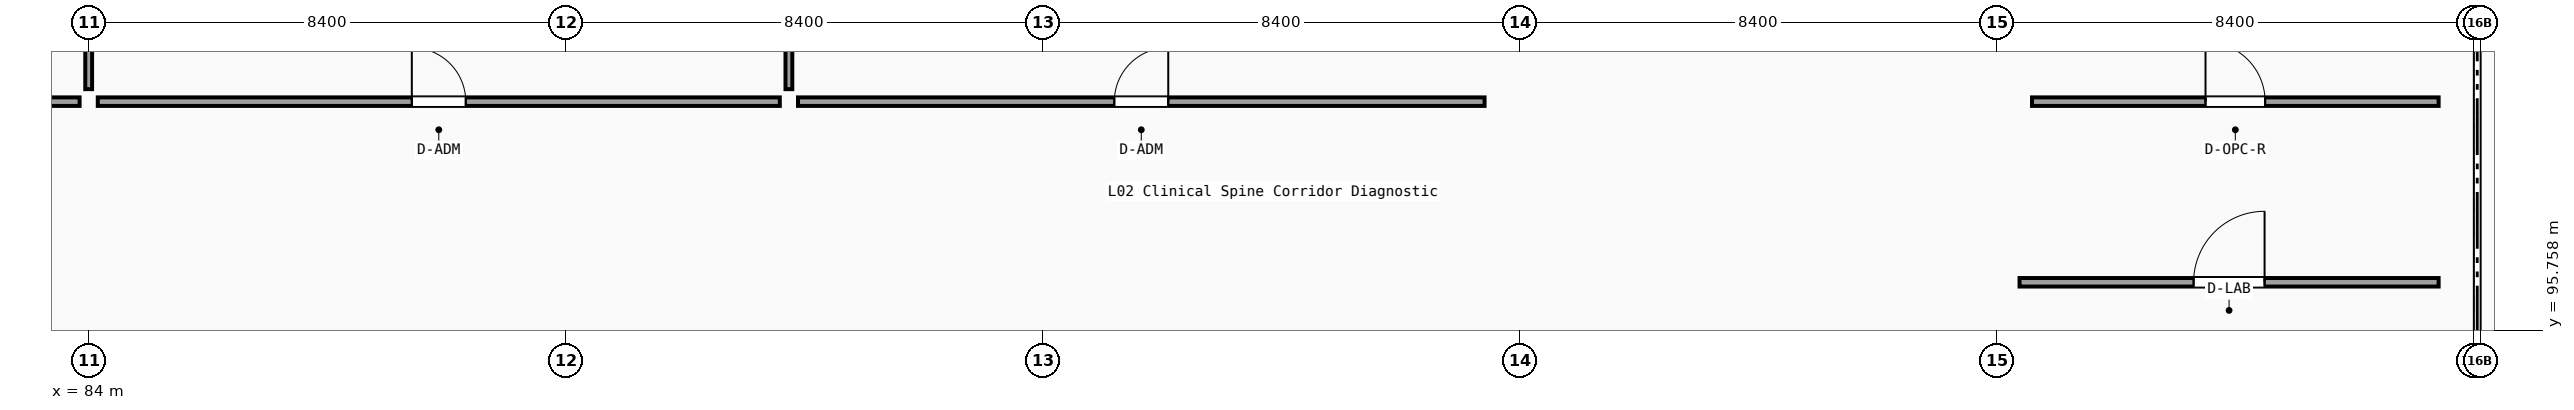
"""IFC4 building model, lengths in metres.
Left out: names, types, materials, properties, quantities, classifications, styles, units other than length and angle.
Written with IfcOpenShell. Run it as: python <this file> out.ifc"""

import sys

from ifc_helpers import new_model, si_unit, direction, frame, frame_2d, origin, place, context, subcontext, project, spatial, rectangle, extrude, element, fill, save


model = new_model("IFC4")
c1 = context("Model", 3, precision=1e-05, world=origin(), true_north=direction((0.0, 1.0)))
c2 = subcontext(c1, "Body", "Model", "MODEL_VIEW")
j1 = project(units=[si_unit("LENGTHUNIT", "METRE"), si_unit("PLANEANGLEUNIT", "RADIAN")], contexts=[c1])
p1 = place(None, origin())
s1 = spatial("IfcSite", under=j1, at=p1, CompositionType="ELEMENT")
p2 = place(p1, origin())
s2 = spatial("IfcBuilding", under=s1, at=p2, CompositionType="ELEMENT")
p3 = place(p2, frame((0.0, 0.0, 10.2)))
s3 = spatial("IfcBuildingStorey", under=s2, at=p3, CompositionType="ELEMENT", Elevation=10.2)
p4 = place(p3, frame((118.0, 96.61, 0.0), z_axis=(0.0, 0.0, 1.0), x_axis=(1.0, 0.0, 0.0)))
e1 = element("IfcWall", 1, at=p4, inside=s3, PredefinedType="PARTITIONING", context=c2, shape_type="SweptSolid", body=[
    extrude(rectangle(XDim=7.38, YDim=0.15, at=frame_2d((3.69, 0.0))), origin(), (0.0, 0.0, 1.0), 4.37),
])
p5 = place(p4, frame((3.065, 0.0, 0.0)))
e2 = element("IfcOpeningElement", 2, at=p5, cuts=e1, PredefinedType="OPENING", context=c2, shape_type="SweptSolid", body=[
    extrude(rectangle(XDim=1.25, YDim=2.2, at=frame_2d((0.625, 1.1))), frame((0.0, 0.085, 0.0), z_axis=(0.0, -1.0, 0.0), x_axis=(1.0, 0.0, 0.0)), (0.0, 0.0, 1.0), 0.17),
])
p6 = place(p3, frame((71.83, 99.79, 0.0), z_axis=(0.0, 0.0, 1.0), x_axis=(1.0, 0.0, 0.0)))
e3 = element("IfcWall", 3, at=p6, inside=s3, PredefinedType="PARTITIONING", context=c2, shape_type="SweptSolid", body=[
    extrude(rectangle(XDim=12.01, YDim=0.15, at=frame_2d((6.005, 0.0))), origin(), (0.0, 0.0, 1.0), 4.04),
])
p7 = place(p6, frame((5.48, 0.0, 0.0)))
e4 = element("IfcOpeningElement", 4, at=p7, cuts=e3, PredefinedType="OPENING", context=c2, shape_type="SweptSolid", body=[
    extrude(rectangle(XDim=1.05, YDim=2.15, at=frame_2d((0.525, 1.075))), frame((0.0, 0.085, 0.0), z_axis=(0.0, -1.0, 0.0), x_axis=(1.0, 0.0, 0.0)), (0.0, 0.0, 1.0), 0.17),
])
p8 = place(p3, frame((84.0, 100.01, 0.0), z_axis=(0.0, 0.0, 1.0), x_axis=(0.0, 1.0, 0.0)))
e5 = element("IfcWall", 5, at=p8, inside=s3, PredefinedType="PARTITIONING", context=c2, shape_type="SweptSolid", body=[
    extrude(rectangle(XDim=16.1, YDim=0.12, at=frame_2d((8.05, 0.0))), origin(), (0.0, 0.0, 1.0), 4.04),
])
p9 = place(p3, frame((84.16, 99.79, 0.0), z_axis=(0.0, 0.0, 1.0), x_axis=(1.0, 0.0, 0.0)))
e6 = element("IfcWall", 6, at=p9, inside=s3, PredefinedType="PARTITIONING", context=c2, shape_type="SweptSolid", body=[
    extrude(rectangle(XDim=12.01, YDim=0.15, at=frame_2d((6.005, 0.0))), origin(), (0.0, 0.0, 1.0), 4.37),
])
p10 = place(p9, frame((5.53, 0.0, 0.0)))
e7 = element("IfcOpeningElement", 7, at=p10, cuts=e6, PredefinedType="OPENING", context=c2, shape_type="SweptSolid", body=[
    extrude(rectangle(XDim=0.95, YDim=2.1, at=frame_2d((0.475, 1.05))), frame((0.0, 0.085, 0.0), z_axis=(0.0, -1.0, 0.0), x_axis=(1.0, 0.0, 0.0)), (0.0, 0.0, 1.0), 0.17),
])
p11 = place(p3, frame((96.33, 100.01, 0.0), z_axis=(0.0, 0.0, 1.0), x_axis=(0.0, 1.0, 0.0)))
e8 = element("IfcWall", 8, at=p11, inside=s3, PredefinedType="PARTITIONING", context=c2, shape_type="SweptSolid", body=[
    extrude(rectangle(XDim=16.1, YDim=0.12, at=frame_2d((8.05, 0.0))), origin(), (0.0, 0.0, 1.0), 4.04),
])
p12 = place(p3, frame((96.49, 99.79, 0.0), z_axis=(0.0, 0.0, 1.0), x_axis=(1.0, 0.0, 0.0)))
e9 = element("IfcWall", 9, at=p12, inside=s3, PredefinedType="PARTITIONING", context=c2, shape_type="SweptSolid", body=[
    extrude(rectangle(XDim=12.09, YDim=0.15, at=frame_2d((6.045, 0.0))), origin(), (0.0, 0.0, 1.0), 4.37),
])
p13 = place(p12, frame((5.57, 0.0, 0.0)))
e10 = element("IfcOpeningElement", 10, at=p13, cuts=e9, PredefinedType="OPENING", context=c2, shape_type="SweptSolid", body=[
    extrude(rectangle(XDim=0.95, YDim=2.1, at=frame_2d((0.475, 1.05))), frame((0.0, 0.085, 0.0), z_axis=(0.0, -1.0, 0.0), x_axis=(1.0, 0.0, 0.0)), (0.0, 0.0, 1.0), 0.17),
])
p14 = place(p3, frame((118.22, 99.79, 0.0), z_axis=(0.0, 0.0, 1.0), x_axis=(1.0, 0.0, 0.0)))
e11 = element("IfcWall", 11, at=p14, inside=s3, PredefinedType="PARTITIONING", context=c2, shape_type="SweptSolid", body=[
    extrude(rectangle(XDim=7.16, YDim=0.15, at=frame_2d((3.58, 0.0))), origin(), (0.0, 0.0, 1.0), 4.37),
])
p15 = place(p14, frame((3.055, 0.0, 0.0)))
e12 = element("IfcOpeningElement", 12, at=p15, cuts=e11, PredefinedType="OPENING", context=c2, shape_type="SweptSolid", body=[
    extrude(rectangle(XDim=1.05, YDim=2.15, at=frame_2d((0.525, 1.075))), frame((0.0, 0.085, 0.0), z_axis=(0.0, -1.0, 0.0), x_axis=(1.0, 0.0, 0.0)), (0.0, 0.0, 1.0), 0.17),
])
p16 = place(p5, origin())
e13 = element("IfcDoor", 13, at=p16, inside=s3, OperationType="SINGLE_SWING_RIGHT", PredefinedType="DOOR", context=c2, shape_type="SweptSolid", body=[
    extrude(rectangle(XDim=1.25, YDim=2.2, at=frame_2d((0.625, 1.1))), frame((0.0, 0.025, 0.0), z_axis=(0.0, -1.0, 0.0), x_axis=(1.0, 0.0, 0.0)), (0.0, 0.0, 1.0), 0.05),
])
fill(e2, e13)
p17 = place(p10, origin())
e14 = element("IfcDoor", 14, at=p17, inside=s3, OperationType="SINGLE_SWING_LEFT", PredefinedType="DOOR", context=c2, shape_type="SweptSolid", body=[
    extrude(rectangle(XDim=0.95, YDim=2.1, at=frame_2d((0.475, 1.05))), frame((0.0, 0.025, 0.0), z_axis=(0.0, -1.0, 0.0), x_axis=(1.0, 0.0, 0.0)), (0.0, 0.0, 1.0), 0.05),
])
fill(e7, e14)
p18 = place(p13, origin())
e15 = element("IfcDoor", 15, at=p18, inside=s3, OperationType="SINGLE_SWING_RIGHT", PredefinedType="DOOR", context=c2, shape_type="SweptSolid", body=[
    extrude(rectangle(XDim=0.95, YDim=2.1, at=frame_2d((0.475, 1.05))), frame((0.0, 0.025, 0.0), z_axis=(0.0, -1.0, 0.0), x_axis=(1.0, 0.0, 0.0)), (0.0, 0.0, 1.0), 0.05),
])
fill(e10, e15)
p19 = place(p15, origin())
e16 = element("IfcDoor", 16, at=p19, inside=s3, OperationType="SINGLE_SWING_LEFT", PredefinedType="DOOR", context=c2, shape_type="SweptSolid", body=[
    extrude(rectangle(XDim=1.05, YDim=2.15, at=frame_2d((0.525, 1.075))), frame((0.0, 0.025, 0.0), z_axis=(0.0, -1.0, 0.0), x_axis=(1.0, 0.0, 0.0)), (0.0, 0.0, 1.0), 0.05),
])
fill(e12, e16)
save(model, sys.argv[1])
